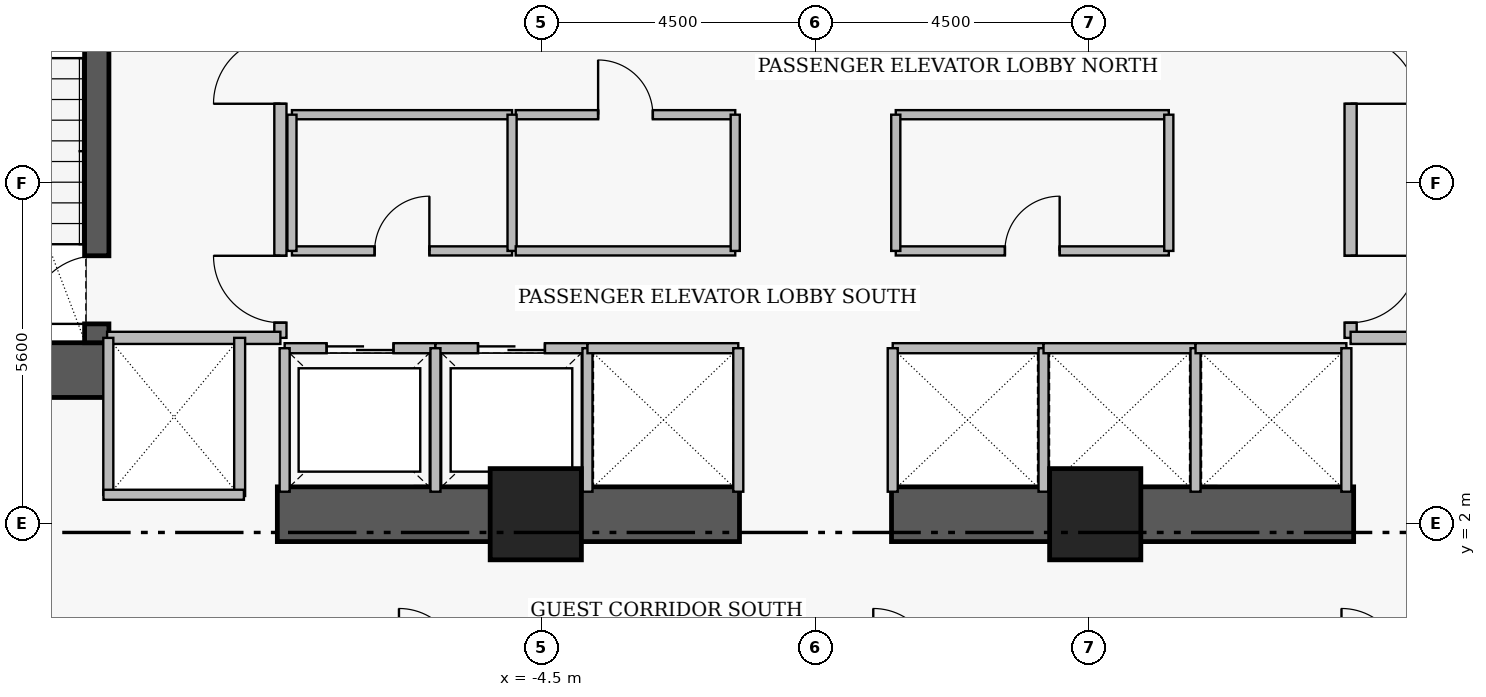
"""IFC4 building model, lengths in metres.
Left out: names, types, materials, properties, quantities, classifications, styles, units other than length and angle.
Written with IfcOpenShell. Run it as: python <this file> out.ifc"""

import sys

from ifc_helpers import new_model, si_unit, direction, frame, frame_2d, origin, origin_2d, place, context, subcontext, project, spatial, rectangle, extrude, element, fill, save


model = new_model("IFC4")
c1 = context("Model", 3, precision=1e-05, world=origin(), true_north=direction((0.0, 1.0)))
c2 = subcontext(c1, "Body", "Model", "MODEL_VIEW")
j1 = project(units=[si_unit("LENGTHUNIT", "METRE"), si_unit("PLANEANGLEUNIT", "RADIAN")], contexts=[c1])
p1 = place(None, origin())
s1 = spatial("IfcSite", under=j1, at=p1, CompositionType="ELEMENT")
p2 = place(p1, origin())
s2 = spatial("IfcBuilding", under=s1, at=p2, CompositionType="ELEMENT")
p3 = place(p2, frame((0.0, 0.0, 49.5)))
s3 = spatial("IfcBuildingStorey", under=s2, at=p3, CompositionType="ELEMENT", Elevation=49.5)
p4 = place(p3, frame((-16.31, 4.52, 0.0), z_axis=(0.0, 0.0, 1.0), x_axis=(1.0, 0.0, 0.0)))
e1 = element("IfcWall", 1, at=p4, inside=s3, PredefinedType="SHEAR", context=c2, shape_type="SweptSolid", body=[
    extrude(rectangle(XDim=4.71, YDim=0.9, at=frame_2d((2.355, 0.0))), origin(), (0.0, 0.0, 1.0), 3.46),
])
for number, where, z_axis, x_axis in (
    (2, (-8.85, 2.15, 0.0), (0.0, 0.0, 1.0), (1.0, 0.0, 0.0)),
    (3, (1.25, 2.15, 0.0), (0.0, 0.0, 1.0), (1.0, 0.0, 0.0)),
):
    element("IfcWall", number, at=place(p3, frame(where, z_axis=z_axis, x_axis=x_axis)), inside=s3, PredefinedType="SHEAR", context=c2, shape_type="SweptSolid", body=[
        extrude(rectangle(XDim=7.6, YDim=0.9, at=frame_2d((3.8, 0.0))), origin(), (0.0, 0.0, 1.0), 3.43),
    ])
p5 = place(p3, frame((-11.82, 4.97, 0.0), z_axis=(0.0, 0.0, 1.0), x_axis=(0.0, 1.0, 0.0)))
e4 = element("IfcWall", 4, at=p5, inside=s3, PredefinedType="SHEAR", context=c2, shape_type="SweptSolid", body=[
    extrude(rectangle(XDim=8.96, YDim=0.4, at=frame_2d((4.48, 0.0))), origin(), (0.0, 0.0, 1.0), 3.46),
])
p6 = place(p5, frame((0.31, 0.0, 0.0)))
e5 = element("IfcOpeningElement", 5, at=p6, cuts=e4, PredefinedType="OPENING", context=c2, shape_type="SweptSolid", body=[
    extrude(rectangle(XDim=1.12, YDim=2.22, at=frame_2d((0.56, 1.11))), frame((0.0, 0.21, 0.0), z_axis=(0.0, -1.0, 0.0), x_axis=(1.0, 0.0, 0.0)), (0.0, 0.0, 1.0), 0.42),
])
for number, where, z_axis, x_axis in (
    (6, (-4.6, 2.15, 0.0), (0.0, 0.0, 1.0), (1.0, 0.0, 0.0)),
    (7, (4.6, 2.15, 0.0), (0.0, 0.0, 1.0), (1.0, 0.0, 0.0)),
):
    element("IfcColumn", number, at=place(p3, frame(where, z_axis=z_axis, x_axis=x_axis)), inside=s3, PredefinedType="COLUMN", context=c2, shape_type="SweptSolid", body=[
        extrude(rectangle(XDim=1.5, YDim=1.5, at=origin_2d()), origin(), (0.0, 0.0, 1.0), 3.65),
    ])
p7 = place(p3, frame((-8.8, 5.05, 0.0), z_axis=(0.0, 0.0, 1.0), x_axis=(0.0, 1.0, 0.0)))
e8 = element("IfcWall", 8, at=p7, inside=s3, PredefinedType="PARTITIONING", context=c2, shape_type="SweptSolid", body=[
    extrude(rectangle(XDim=6.1, YDim=0.2, at=frame_2d((3.05, 0.0))), origin(), (0.0, 0.0, 1.0), 3.43),
])
p8 = place(p7, frame((0.25, 0.0, 0.0)))
e9 = element("IfcOpeningElement", 9, at=p8, cuts=e8, PredefinedType="OPENING", context=c2, shape_type="SweptSolid", body=[
    extrude(rectangle(XDim=1.1, YDim=2.2, at=frame_2d((0.55, 1.1))), frame((0.0, 0.11, 0.0), z_axis=(0.0, -1.0, 0.0), x_axis=(1.0, 0.0, 0.0)), (0.0, 0.0, 1.0), 0.22),
])
p9 = place(p7, frame((3.85, 0.0, 0.0)))
e10 = element("IfcOpeningElement", 10, at=p9, cuts=e8, PredefinedType="OPENING", context=c2, shape_type="SweptSolid", body=[
    extrude(rectangle(XDim=1.1, YDim=2.2, at=frame_2d((0.55, 1.1))), frame((0.0, 0.11, 0.0), z_axis=(0.0, -1.0, 0.0), x_axis=(1.0, 0.0, 0.0)), (0.0, 0.0, 1.0), 0.22),
])
p10 = place(p3, frame((8.8, 11.15, 0.0), z_axis=(0.0, 0.0, 1.0), x_axis=(0.0, -1.0, 0.0)))
e11 = element("IfcWall", 11, at=p10, inside=s3, PredefinedType="PARTITIONING", context=c2, shape_type="SweptSolid", body=[
    extrude(rectangle(XDim=6.1, YDim=0.2, at=frame_2d((3.05, 0.0))), origin(), (0.0, 0.0, 1.0), 3.43),
])
p11 = place(p10, frame((1.15, 0.0, 0.0)))
e12 = element("IfcOpeningElement", 12, at=p11, cuts=e11, PredefinedType="OPENING", context=c2, shape_type="SweptSolid", body=[
    extrude(rectangle(XDim=1.1, YDim=2.2, at=frame_2d((0.55, 1.1))), frame((0.0, 0.11, 0.0), z_axis=(0.0, -1.0, 0.0), x_axis=(1.0, 0.0, 0.0)), (0.0, 0.0, 1.0), 0.22),
])
p12 = place(p10, frame((4.75, 0.0, 0.0)))
e13 = element("IfcOpeningElement", 13, at=p12, cuts=e11, PredefinedType="OPENING", context=c2, shape_type="SweptSolid", body=[
    extrude(rectangle(XDim=1.1, YDim=2.2, at=frame_2d((0.55, 1.1))), frame((0.0, 0.11, 0.0), z_axis=(0.0, -1.0, 0.0), x_axis=(1.0, 0.0, 0.0)), (0.0, 0.0, 1.0), 0.22),
])
p13 = place(p3, frame((-8.73, 4.88, 0.0), z_axis=(0.0, 0.0, 1.0), x_axis=(1.0, 0.0, 0.0)))
e14 = element("IfcWall", 14, at=p13, inside=s3, PredefinedType="PARTITIONING", context=c2, shape_type="SweptSolid", body=[
    extrude(rectangle(XDim=2.48, YDim=0.165, at=frame_2d((1.24, 0.0))), origin(), (0.0, 0.0, 1.0), 3.43),
])
p14 = place(p13, frame((0.69, 0.0, 0.0)))
e15 = element("IfcOpeningElement", 15, at=p14, cuts=e14, PredefinedType="OPENING", context=c2, shape_type="SweptSolid", body=[
    extrude(rectangle(XDim=1.1, YDim=2.25, at=frame_2d((0.55, 1.125))), frame((0.0, 0.093, 0.0), z_axis=(0.0, -1.0, 0.0), x_axis=(1.0, 0.0, 0.0)), (0.0, 0.0, 1.0), 0.185),
])
p15 = place(p3, frame((-6.25, 4.88, 0.0), z_axis=(0.0, 0.0, 1.0), x_axis=(1.0, 0.0, 0.0)))
e16 = element("IfcWall", 16, at=p15, inside=s3, PredefinedType="PARTITIONING", context=c2, shape_type="SweptSolid", body=[
    extrude(rectangle(XDim=2.5, YDim=0.165, at=frame_2d((1.25, 0.0))), origin(), (0.0, 0.0, 1.0), 3.43),
])
p16 = place(p15, frame((0.7, 0.0, 0.0)))
e17 = element("IfcOpeningElement", 17, at=p16, cuts=e16, PredefinedType="OPENING", context=c2, shape_type="SweptSolid", body=[
    extrude(rectangle(XDim=1.1, YDim=2.25, at=frame_2d((0.55, 1.125))), frame((0.0, 0.093, 0.0), z_axis=(0.0, -1.0, 0.0), x_axis=(1.0, 0.0, 0.0)), (0.0, 0.0, 1.0), 0.185),
])
p17 = place(p3, frame((-8.61, 6.48, 0.0), z_axis=(0.0, 0.0, 1.0), x_axis=(1.0, 0.0, 0.0)))
e18 = element("IfcWall", 18, at=p17, inside=s3, PredefinedType="PARTITIONING", context=c2, shape_type="SweptSolid", body=[
    extrude(rectangle(XDim=3.62, YDim=0.15, at=frame_2d((1.81, 0.0))), origin(), (0.0, 0.0, 1.0), 3.43),
])
p18 = place(p17, frame((1.36, 0.0, 0.0)))
e19 = element("IfcOpeningElement", 19, at=p18, cuts=e18, PredefinedType="OPENING", context=c2, shape_type="SweptSolid", body=[
    extrude(rectangle(XDim=0.9, YDim=2.15, at=frame_2d((0.45, 1.075))), frame((0.0, 0.085, 0.0), z_axis=(0.0, -1.0, 0.0), x_axis=(1.0, 0.0, 0.0)), (0.0, 0.0, 1.0), 0.17),
])
p19 = place(p3, frame((-4.93, 8.72, 0.0), z_axis=(0.0, 0.0, 1.0), x_axis=(1.0, 0.0, 0.0)))
e20 = element("IfcWall", 20, at=p19, inside=s3, PredefinedType="PARTITIONING", context=c2, shape_type="SweptSolid", body=[
    extrude(rectangle(XDim=3.61, YDim=0.15, at=frame_2d((1.805, 0.0))), origin(), (0.0, 0.0, 1.0), 3.43),
])
p20 = place(p19, frame((1.355, 0.0, 0.0)))
e21 = element("IfcOpeningElement", 21, at=p20, cuts=e20, PredefinedType="OPENING", context=c2, shape_type="SweptSolid", body=[
    extrude(rectangle(XDim=0.9, YDim=2.15, at=frame_2d((0.45, 1.075))), frame((0.0, 0.085, 0.0), z_axis=(0.0, -1.0, 0.0), x_axis=(1.0, 0.0, 0.0)), (0.0, 0.0, 1.0), 0.17),
])
p21 = place(p3, frame((1.32, 6.48, 0.0), z_axis=(0.0, 0.0, 1.0), x_axis=(1.0, 0.0, 0.0)))
e22 = element("IfcWall", 22, at=p21, inside=s3, PredefinedType="PARTITIONING", context=c2, shape_type="SweptSolid", body=[
    extrude(rectangle(XDim=4.49, YDim=0.15, at=frame_2d((2.245, 0.0))), origin(), (0.0, 0.0, 1.0), 3.43),
])
p22 = place(p21, frame((1.795, 0.0, 0.0)))
e23 = element("IfcOpeningElement", 23, at=p22, cuts=e22, PredefinedType="OPENING", context=c2, shape_type="SweptSolid", body=[
    extrude(rectangle(XDim=0.9, YDim=2.15, at=frame_2d((0.45, 1.075))), frame((0.0, 0.085, 0.0), z_axis=(0.0, -1.0, 0.0), x_axis=(1.0, 0.0, 0.0)), (0.0, 0.0, 1.0), 0.17),
])
for number, where, z_axis, x_axis in (
    (24, (-11.65, 5.05, 0.0), (0.0, 0.0, 1.0), (1.0, 0.0, 0.0)),
    (25, (8.8, 5.05, 0.0), (0.0, 0.0, 1.0), (1.0, 0.0, 0.0)),
):
    element("IfcWall", number, at=place(p3, frame(where, z_axis=z_axis, x_axis=x_axis)), inside=s3, PredefinedType="PARTITIONING", context=c2, shape_type="SweptSolid", body=[
        extrude(rectangle(XDim=2.85, YDim=0.2, at=frame_2d((1.425, 0.0))), origin(), (0.0, 0.0, 1.0), 3.43),
    ])
for number, where, z_axis, x_axis in (
    (26, (-8.73, 2.52, 0.0), (0.0, 0.0, 1.0), (0.0, 1.0, 0.0)),
    (27, (-6.25, 2.52, 0.0), (0.0, 0.0, 1.0), (0.0, 1.0, 0.0)),
    (28, (-3.75, 2.52, 0.0), (0.0, 0.0, 1.0), (0.0, 1.0, 0.0)),
):
    element("IfcWall", number, at=place(p3, frame(where, z_axis=z_axis, x_axis=x_axis)), inside=s3, PredefinedType="PARTITIONING", context=c2, shape_type="SweptSolid", body=[
        extrude(rectangle(XDim=2.36, YDim=0.165, at=frame_2d((1.18, 0.0))), origin(), (0.0, 0.0, 1.0), 3.43),
    ])
p23 = place(p3, frame((-3.75, 4.88, 0.0), z_axis=(0.0, 0.0, 1.0), x_axis=(1.0, 0.0, 0.0)))
e29 = element("IfcWall", 29, at=p23, inside=s3, PredefinedType="PARTITIONING", context=c2, shape_type="SweptSolid", body=[
    extrude(rectangle(XDim=2.48, YDim=0.165, at=frame_2d((1.24, 0.0))), origin(), (0.0, 0.0, 1.0), 3.43),
])
p24 = place(p3, frame((-1.27, 2.52, 0.0), z_axis=(0.0, 0.0, 1.0), x_axis=(0.0, 1.0, 0.0)))
e30 = element("IfcWall", 30, at=p24, inside=s3, PredefinedType="PARTITIONING", context=c2, shape_type="SweptSolid", body=[
    extrude(rectangle(XDim=2.36, YDim=0.165, at=frame_2d((1.18, 0.0))), origin(), (0.0, 0.0, 1.0), 3.43),
])
p25 = place(p3, frame((1.27, 4.88, 0.0), z_axis=(0.0, 0.0, 1.0), x_axis=(1.0, 0.0, 0.0)))
e31 = element("IfcWall", 31, at=p25, inside=s3, PredefinedType="PARTITIONING", context=c2, shape_type="SweptSolid", body=[
    extrude(rectangle(XDim=2.48, YDim=0.165, at=frame_2d((1.24, 0.0))), origin(), (0.0, 0.0, 1.0), 3.43),
])
for number, where, z_axis, x_axis in (
    (32, (1.27, 2.52, 0.0), (0.0, 0.0, 1.0), (0.0, 1.0, 0.0)),
    (33, (3.75, 2.52, 0.0), (0.0, 0.0, 1.0), (0.0, 1.0, 0.0)),
):
    element("IfcWall", number, at=place(p3, frame(where, z_axis=z_axis, x_axis=x_axis)), inside=s3, PredefinedType="PARTITIONING", context=c2, shape_type="SweptSolid", body=[
        extrude(rectangle(XDim=2.36, YDim=0.165, at=frame_2d((1.18, 0.0))), origin(), (0.0, 0.0, 1.0), 3.43),
    ])
p26 = place(p3, frame((3.75, 4.88, 0.0), z_axis=(0.0, 0.0, 1.0), x_axis=(1.0, 0.0, 0.0)))
e34 = element("IfcWall", 34, at=p26, inside=s3, PredefinedType="PARTITIONING", context=c2, shape_type="SweptSolid", body=[
    extrude(rectangle(XDim=2.5, YDim=0.165, at=frame_2d((1.25, 0.0))), origin(), (0.0, 0.0, 1.0), 3.43),
])
p27 = place(p3, frame((6.25, 2.52, 0.0), z_axis=(0.0, 0.0, 1.0), x_axis=(0.0, 1.0, 0.0)))
e35 = element("IfcWall", 35, at=p27, inside=s3, PredefinedType="PARTITIONING", context=c2, shape_type="SweptSolid", body=[
    extrude(rectangle(XDim=2.36, YDim=0.165, at=frame_2d((1.18, 0.0))), origin(), (0.0, 0.0, 1.0), 3.43),
])
p28 = place(p3, frame((6.25, 4.88, 0.0), z_axis=(0.0, 0.0, 1.0), x_axis=(1.0, 0.0, 0.0)))
e36 = element("IfcWall", 36, at=p28, inside=s3, PredefinedType="PARTITIONING", context=c2, shape_type="SweptSolid", body=[
    extrude(rectangle(XDim=2.48, YDim=0.165, at=frame_2d((1.24, 0.0))), origin(), (0.0, 0.0, 1.0), 3.43),
])
p29 = place(p3, frame((8.73, 2.52, 0.0), z_axis=(0.0, 0.0, 1.0), x_axis=(0.0, 1.0, 0.0)))
e37 = element("IfcWall", 37, at=p29, inside=s3, PredefinedType="PARTITIONING", context=c2, shape_type="SweptSolid", body=[
    extrude(rectangle(XDim=2.36, YDim=0.165, at=frame_2d((1.18, 0.0))), origin(), (0.0, 0.0, 1.0), 3.43),
])
p30 = place(p3, frame((-9.47, 2.45, 0.0), z_axis=(0.0, 0.0, 1.0), x_axis=(0.0, 1.0, 0.0)))
e38 = element("IfcWall", 38, at=p30, inside=s3, PredefinedType="PARTITIONING", context=c2, shape_type="SweptSolid", body=[
    extrude(rectangle(XDim=2.6, YDim=0.18, at=frame_2d((1.3, 0.0))), origin(), (0.0, 0.0, 1.0), 3.43),
])
p31 = place(p3, frame((-11.63, 2.47, 0.0), z_axis=(0.0, 0.0, 1.0), x_axis=(0.0, 1.0, 0.0)))
e39 = element("IfcWall", 39, at=p31, inside=s3, PredefinedType="PARTITIONING", context=c2, shape_type="SweptSolid", body=[
    extrude(rectangle(XDim=2.58, YDim=0.165, at=frame_2d((1.29, 0.0))), origin(), (0.0, 0.0, 1.0), 3.43),
])
p32 = place(p3, frame((-11.71, 2.47, 0.0), z_axis=(0.0, 0.0, 1.0), x_axis=(1.0, 0.0, 0.0)))
e40 = element("IfcWall", 40, at=p32, inside=s3, PredefinedType="PARTITIONING", context=c2, shape_type="SweptSolid", body=[
    extrude(rectangle(XDim=2.31, YDim=0.165, at=frame_2d((1.155, 0.0))), origin(), (0.0, 0.0, 1.0), 2.03),
])
p33 = place(p3, frame((-8.61, 8.72, 0.0), z_axis=(0.0, 0.0, 1.0), x_axis=(1.0, 0.0, 0.0)))
e41 = element("IfcWall", 41, at=p33, inside=s3, PredefinedType="PARTITIONING", context=c2, shape_type="SweptSolid", body=[
    extrude(rectangle(XDim=3.62, YDim=0.15, at=frame_2d((1.81, 0.0))), origin(), (0.0, 0.0, 1.0), 3.43),
])
for number, where, z_axis, x_axis in (
    (42, (-8.61, 6.48, 0.0), (0.0, 0.0, 1.0), (0.0, 1.0, 0.0)),
    (43, (-4.99, 6.48, 0.0), (0.0, 0.0, 1.0), (0.0, 1.0, 0.0)),
):
    element("IfcWall", number, at=place(p3, frame(where, z_axis=z_axis, x_axis=x_axis)), inside=s3, PredefinedType="PARTITIONING", context=c2, shape_type="SweptSolid", body=[
        extrude(rectangle(XDim=2.24, YDim=0.15, at=frame_2d((1.12, 0.0))), origin(), (0.0, 0.0, 1.0), 3.43),
    ])
p34 = place(p3, frame((-4.93, 6.48, 0.0), z_axis=(0.0, 0.0, 1.0), x_axis=(1.0, 0.0, 0.0)))
e44 = element("IfcWall", 44, at=p34, inside=s3, PredefinedType="PARTITIONING", context=c2, shape_type="SweptSolid", body=[
    extrude(rectangle(XDim=3.61, YDim=0.15, at=frame_2d((1.805, 0.0))), origin(), (0.0, 0.0, 1.0), 3.43),
])
p35 = place(p3, frame((-1.32, 6.48, 0.0), z_axis=(0.0, 0.0, 1.0), x_axis=(0.0, 1.0, 0.0)))
e45 = element("IfcWall", 45, at=p35, inside=s3, PredefinedType="PARTITIONING", context=c2, shape_type="SweptSolid", body=[
    extrude(rectangle(XDim=2.24, YDim=0.15, at=frame_2d((1.12, 0.0))), origin(), (0.0, 0.0, 1.0), 3.43),
])
p36 = place(p3, frame((1.32, 8.72, 0.0), z_axis=(0.0, 0.0, 1.0), x_axis=(1.0, 0.0, 0.0)))
e46 = element("IfcWall", 46, at=p36, inside=s3, PredefinedType="PARTITIONING", context=c2, shape_type="SweptSolid", body=[
    extrude(rectangle(XDim=4.49, YDim=0.15, at=frame_2d((2.245, 0.0))), origin(), (0.0, 0.0, 1.0), 3.43),
])
for number, where, z_axis, x_axis in (
    (47, (1.32, 6.48, 0.0), (0.0, 0.0, 1.0), (0.0, 1.0, 0.0)),
    (48, (5.81, 6.48, 0.0), (0.0, 0.0, 1.0), (0.0, 1.0, 0.0)),
):
    element("IfcWall", number, at=place(p3, frame(where, z_axis=z_axis, x_axis=x_axis)), inside=s3, PredefinedType="PARTITIONING", context=c2, shape_type="SweptSolid", body=[
        extrude(rectangle(XDim=2.24, YDim=0.15, at=frame_2d((1.12, 0.0))), origin(), (0.0, 0.0, 1.0), 3.43),
    ])
p37 = place(p6, origin())
e49 = element("IfcDoor", 49, at=p37, inside=s3, OperationType="SINGLE_SWING_LEFT", PredefinedType="DOOR", context=c2, shape_type="SweptSolid", body=[
    extrude(rectangle(XDim=1.12, YDim=2.22, at=frame_2d((0.56, 1.11))), frame((0.0, 0.025, 0.0), z_axis=(0.0, -1.0, 0.0), x_axis=(1.0, 0.0, 0.0)), (0.0, 0.0, 1.0), 0.05),
])
fill(e5, e49)
p38 = place(p8, origin())
e50 = element("IfcDoor", 50, at=p38, inside=s3, OperationType="SINGLE_SWING_RIGHT", PredefinedType="DOOR", context=c2, shape_type="SweptSolid", body=[
    extrude(rectangle(XDim=1.1, YDim=2.2, at=frame_2d((0.55, 1.1))), frame((0.0, 0.025, 0.0), z_axis=(0.0, -1.0, 0.0), x_axis=(1.0, 0.0, 0.0)), (0.0, 0.0, 1.0), 0.05),
])
fill(e9, e50)
p39 = place(p9, origin())
e51 = element("IfcDoor", 51, at=p39, inside=s3, OperationType="SINGLE_SWING_LEFT", PredefinedType="DOOR", context=c2, shape_type="SweptSolid", body=[
    extrude(rectangle(XDim=1.1, YDim=2.2, at=frame_2d((0.55, 1.1))), frame((0.0, 0.025, 0.0), z_axis=(0.0, -1.0, 0.0), x_axis=(1.0, 0.0, 0.0)), (0.0, 0.0, 1.0), 0.05),
])
fill(e10, e51)
p40 = place(p11, origin())
e52 = element("IfcDoor", 52, at=p40, inside=s3, OperationType="SINGLE_SWING_RIGHT", PredefinedType="DOOR", context=c2, shape_type="SweptSolid", body=[
    extrude(rectangle(XDim=1.1, YDim=2.2, at=frame_2d((0.55, 1.1))), frame((0.0, 0.025, 0.0), z_axis=(0.0, -1.0, 0.0), x_axis=(1.0, 0.0, 0.0)), (0.0, 0.0, 1.0), 0.05),
])
fill(e12, e52)
p41 = place(p12, origin())
e53 = element("IfcDoor", 53, at=p41, inside=s3, OperationType="SINGLE_SWING_LEFT", PredefinedType="DOOR", context=c2, shape_type="SweptSolid", body=[
    extrude(rectangle(XDim=1.1, YDim=2.2, at=frame_2d((0.55, 1.1))), frame((0.0, 0.025, 0.0), z_axis=(0.0, -1.0, 0.0), x_axis=(1.0, 0.0, 0.0)), (0.0, 0.0, 1.0), 0.05),
])
fill(e13, e53)
p42 = place(p14, origin())
e54 = element("IfcDoor", 54, at=p42, inside=s3, OperationType="SLIDING_TO_LEFT", PredefinedType="DOOR", context=c2, shape_type="SweptSolid", body=[
    extrude(rectangle(XDim=1.1, YDim=2.25, at=frame_2d((0.55, 1.125))), frame((0.0, 0.025, 0.0), z_axis=(0.0, -1.0, 0.0), x_axis=(1.0, 0.0, 0.0)), (0.0, 0.0, 1.0), 0.05),
])
fill(e15, e54)
p43 = place(p16, origin())
e55 = element("IfcDoor", 55, at=p43, inside=s3, OperationType="SLIDING_TO_LEFT", PredefinedType="DOOR", context=c2, shape_type="SweptSolid", body=[
    extrude(rectangle(XDim=1.1, YDim=2.25, at=frame_2d((0.55, 1.125))), frame((0.0, 0.025, 0.0), z_axis=(0.0, -1.0, 0.0), x_axis=(1.0, 0.0, 0.0)), (0.0, 0.0, 1.0), 0.05),
])
fill(e17, e55)
p44 = place(p18, origin())
e56 = element("IfcDoor", 56, at=p44, inside=s3, OperationType="SINGLE_SWING_RIGHT", PredefinedType="DOOR", context=c2, shape_type="SweptSolid", body=[
    extrude(rectangle(XDim=0.9, YDim=2.15, at=frame_2d((0.45, 1.075))), frame((0.0, 0.025, 0.0), z_axis=(0.0, -1.0, 0.0), x_axis=(1.0, 0.0, 0.0)), (0.0, 0.0, 1.0), 0.05),
])
fill(e19, e56)
p45 = place(p20, origin())
e57 = element("IfcDoor", 57, at=p45, inside=s3, OperationType="SINGLE_SWING_LEFT", PredefinedType="DOOR", context=c2, shape_type="SweptSolid", body=[
    extrude(rectangle(XDim=0.9, YDim=2.15, at=frame_2d((0.45, 1.075))), frame((0.0, 0.025, 0.0), z_axis=(0.0, -1.0, 0.0), x_axis=(1.0, 0.0, 0.0)), (0.0, 0.0, 1.0), 0.05),
])
fill(e21, e57)
p46 = place(p22, origin())
e58 = element("IfcDoor", 58, at=p46, inside=s3, OperationType="SINGLE_SWING_RIGHT", PredefinedType="DOOR", context=c2, shape_type="SweptSolid", body=[
    extrude(rectangle(XDim=0.9, YDim=2.15, at=frame_2d((0.45, 1.075))), frame((0.0, 0.025, 0.0), z_axis=(0.0, -1.0, 0.0), x_axis=(1.0, 0.0, 0.0)), (0.0, 0.0, 1.0), 0.05),
])
fill(e23, e58)
save(model, sys.argv[1])
